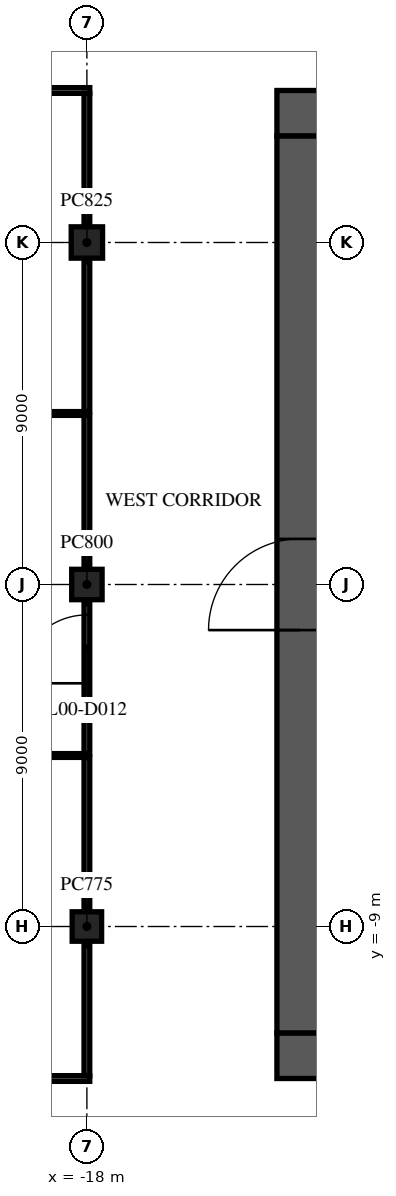
"""IFC4 building model, lengths in metres.
Left out: names, types, materials, properties, quantities, classifications, styles, units other than length and angle.
Written with IfcOpenShell. Run it as: python <this file> out.ifc"""

import sys

from ifc_helpers import new_model, si_unit, direction, frame, frame_2d, origin, origin_2d, place, context, subcontext, project, spatial, rectangle, extrude, element, fill, save


model = new_model("IFC4")
c1 = context("Model", 3, precision=1e-05, world=origin(), true_north=direction((0.0, 1.0)))
c2 = subcontext(c1, "Body", "Model", "MODEL_VIEW")
j1 = project(units=[si_unit("LENGTHUNIT", "METRE"), si_unit("PLANEANGLEUNIT", "RADIAN")], contexts=[c1])
p1 = place(None, origin())
s1 = spatial("IfcSite", under=j1, at=p1, CompositionType="ELEMENT")
p2 = place(p1, origin())
s2 = spatial("IfcBuilding", under=s1, at=p2, CompositionType="ELEMENT")
p3 = place(p2, origin())
s3 = spatial("IfcBuildingStorey", under=s2, at=p3, CompositionType="ELEMENT", Elevation=0.0)
p4 = place(p3, frame((-18.0, -9.0, 0.0), z_axis=(0.0, 0.0, 1.0), x_axis=(1.0, 0.0, 0.0)))
e1 = element("IfcColumn", 1, at=p4, inside=s3, PredefinedType="COLUMN", context=c2, shape_type="SweptSolid", body=[
    extrude(rectangle(XDim=0.775, YDim=0.775, at=origin_2d()), origin(), (0.0, 0.0, 1.0), 4.5),
])
p5 = place(p3, frame((-18.0, 0.0, 0.0), z_axis=(0.0, 0.0, 1.0), x_axis=(1.0, 0.0, 0.0)))
e2 = element("IfcColumn", 2, at=p5, inside=s3, PredefinedType="COLUMN", context=c2, shape_type="SweptSolid", body=[
    extrude(rectangle(XDim=0.8, YDim=0.8, at=origin_2d()), origin(), (0.0, 0.0, 1.0), 4.5),
])
p6 = place(p3, frame((-18.0, 9.0, 0.0), z_axis=(0.0, 0.0, 1.0), x_axis=(1.0, 0.0, 0.0)))
e3 = element("IfcColumn", 3, at=p6, inside=s3, PredefinedType="COLUMN", context=c2, shape_type="SweptSolid", body=[
    extrude(rectangle(XDim=0.825, YDim=0.825, at=origin_2d()), origin(), (0.0, 0.0, 1.0), 4.5),
])
p7 = place(p3, frame((-13.0, 12.4, 0.0), z_axis=(0.0, 0.0, 1.0), x_axis=(1.0, 0.0, 0.0)))
e4 = element("IfcWall", 4, at=p7, inside=s3, PredefinedType="SHEAR", context=c2, shape_type="SweptSolid", body=[
    extrude(rectangle(XDim=26.0, YDim=1.2, at=frame_2d((13.0, 0.0))), origin(), (0.0, 0.0, 1.0), 4.1),
])
p8 = place(p7, frame((11.8, 0.0, 0.0)))
e5 = element("IfcOpeningElement", 5, at=p8, cuts=e4, PredefinedType="OPENING", context=c2, shape_type="SweptSolid", body=[
    extrude(rectangle(XDim=2.4, YDim=2.4, at=frame_2d((1.2, 1.2))), frame((0.0, 0.61, 0.0), z_axis=(0.0, -1.0, 0.0), x_axis=(1.0, 0.0, 0.0)), (0.0, 0.0, 1.0), 1.22),
])
p9 = place(p7, frame((22.625, 0.0, 0.0)))
e6 = element("IfcOpeningElement", 6, at=p9, cuts=e4, PredefinedType="OPENING", context=c2, shape_type="SweptSolid", body=[
    extrude(rectangle(XDim=1.2, YDim=2.1, at=frame_2d((0.6, 1.05))), frame((0.0, 0.61, 0.0), z_axis=(0.0, -1.0, 0.0), x_axis=(1.0, 0.0, 0.0)), (0.0, 0.0, 1.0), 1.22),
])
p10 = place(p7, frame((1.6, 0.0, 0.0)))
e7 = element("IfcOpeningElement", 7, at=p10, cuts=e4, PredefinedType="OPENING", context=c2, shape_type="SweptSolid", body=[
    extrude(rectangle(XDim=1.0, YDim=2.1, at=frame_2d((0.5, 1.05))), frame((0.0, 0.61, 0.0), z_axis=(0.0, -1.0, 0.0), x_axis=(1.0, 0.0, 0.0)), (0.0, 0.0, 1.0), 1.22),
])
p11 = place(p3, frame((-13.0, -12.4, 0.0), z_axis=(0.0, 0.0, 1.0), x_axis=(1.0, 0.0, 0.0)))
e8 = element("IfcWall", 8, at=p11, inside=s3, PredefinedType="SHEAR", context=c2, shape_type="SweptSolid", body=[
    extrude(rectangle(XDim=26.0, YDim=1.2, at=frame_2d((13.0, 0.0))), origin(), (0.0, 0.0, 1.0), 4.1),
])
p12 = place(p11, frame((7.9, 0.0, 0.0)))
e9 = element("IfcOpeningElement", 9, at=p12, cuts=e8, PredefinedType="OPENING", context=c2, shape_type="SweptSolid", body=[
    extrude(rectangle(XDim=2.0, YDim=2.1, at=frame_2d((1.0, 1.05))), frame((0.0, 0.61, 0.0), z_axis=(0.0, -1.0, 0.0), x_axis=(1.0, 0.0, 0.0)), (0.0, 0.0, 1.0), 1.22),
])
p13 = place(p11, frame((18.025, 0.0, 0.0)))
e10 = element("IfcOpeningElement", 10, at=p13, cuts=e8, PredefinedType="OPENING", context=c2, shape_type="SweptSolid", body=[
    extrude(rectangle(XDim=1.2, YDim=2.1, at=frame_2d((0.6, 1.05))), frame((0.0, 0.61, 0.0), z_axis=(0.0, -1.0, 0.0), x_axis=(1.0, 0.0, 0.0)), (0.0, 0.0, 1.0), 1.22),
])
p14 = place(p11, frame((2.175, 0.0, 0.0)))
e11 = element("IfcOpeningElement", 11, at=p14, cuts=e8, PredefinedType="OPENING", context=c2, shape_type="SweptSolid", body=[
    extrude(rectangle(XDim=1.2, YDim=2.1, at=frame_2d((0.6, 1.05))), frame((0.0, 0.61, 0.0), z_axis=(0.0, -1.0, 0.0), x_axis=(1.0, 0.0, 0.0)), (0.0, 0.0, 1.0), 1.22),
])
p15 = place(p11, frame((22.625, 0.0, 0.0)))
e12 = element("IfcOpeningElement", 12, at=p15, cuts=e8, PredefinedType="OPENING", context=c2, shape_type="SweptSolid", body=[
    extrude(rectangle(XDim=1.2, YDim=2.1, at=frame_2d((0.6, 1.05))), frame((0.0, 0.61, 0.0), z_axis=(0.0, -1.0, 0.0), x_axis=(1.0, 0.0, 0.0)), (0.0, 0.0, 1.0), 1.22),
])
p16 = place(p3, frame((-12.4, -11.8, 0.0), z_axis=(0.0, 0.0, 1.0), x_axis=(0.0, 1.0, 0.0)))
e13 = element("IfcWall", 13, at=p16, inside=s3, PredefinedType="SHEAR", context=c2, shape_type="SweptSolid", body=[
    extrude(rectangle(XDim=23.6, YDim=1.2, at=frame_2d((11.8, 0.0))), origin(), (0.0, 0.0, 1.0), 4.1),
])
p17 = place(p16, frame((10.6, 0.0, 0.0)))
e14 = element("IfcOpeningElement", 14, at=p17, cuts=e13, PredefinedType="OPENING", context=c2, shape_type="SweptSolid", body=[
    extrude(rectangle(XDim=2.4, YDim=2.4, at=frame_2d((1.2, 1.2))), frame((0.0, 0.61, 0.0), z_axis=(0.0, -1.0, 0.0), x_axis=(1.0, 0.0, 0.0)), (0.0, 0.0, 1.0), 1.22),
])
p18 = place(p3, frame((-36.0, -13.0, 0.0), z_axis=(0.0, 0.0, 1.0), x_axis=(1.0, 0.0, 0.0)))
e15 = element("IfcWall", 15, at=p18, inside=s3, PredefinedType="PARTITIONING", context=c2, shape_type="SweptSolid", body=[
    extrude(rectangle(XDim=18.075, YDim=0.15, at=frame_2d((9.038, 0.0))), origin(), (0.0, 0.0, 1.0), 4.1),
])
p19 = place(p18, frame((8.1, 0.0, 0.0)))
e16 = element("IfcOpeningElement", 16, at=p19, cuts=e15, PredefinedType="OPENING", context=c2, shape_type="SweptSolid", body=[
    extrude(rectangle(XDim=1.8, YDim=2.1, at=frame_2d((0.9, 1.05))), frame((0.0, 0.085, 0.0), z_axis=(0.0, -1.0, 0.0), x_axis=(1.0, 0.0, 0.0)), (0.0, 0.0, 1.0), 0.17),
])
for number, where, z_axis, x_axis in (
    (17, (-36.0, -4.5, 0.0), (0.0, 0.0, 1.0), (1.0, 0.0, 0.0)),
    (18, (-36.0, 4.5, 0.0), (0.0, 0.0, 1.0), (1.0, 0.0, 0.0)),
):
    element("IfcWall", number, at=place(p3, frame(where, z_axis=z_axis, x_axis=x_axis)), inside=s3, PredefinedType="PARTITIONING", context=c2, shape_type="SweptSolid", body=[
        extrude(rectangle(XDim=17.925, YDim=0.1, at=frame_2d((8.962, 0.0))), origin(), (0.0, 0.0, 1.0), 4.1),
    ])
p20 = place(p3, frame((-36.0, 13.0, 0.0), z_axis=(0.0, 0.0, 1.0), x_axis=(1.0, 0.0, 0.0)))
e19 = element("IfcWall", 19, at=p20, inside=s3, PredefinedType="PARTITIONING", context=c2, shape_type="SweptSolid", body=[
    extrude(rectangle(XDim=18.075, YDim=0.15, at=frame_2d((9.038, 0.0))), origin(), (0.0, 0.0, 1.0), 4.1),
])
p21 = place(p20, frame((8.5, 0.0, 0.0)))
e20 = element("IfcOpeningElement", 20, at=p21, cuts=e19, PredefinedType="OPENING", context=c2, shape_type="SweptSolid", body=[
    extrude(rectangle(XDim=1.0, YDim=2.1, at=frame_2d((0.5, 1.05))), frame((0.0, 0.085, 0.0), z_axis=(0.0, -1.0, 0.0), x_axis=(1.0, 0.0, 0.0)), (0.0, 0.0, 1.0), 0.17),
])
p22 = place(p3, frame((-18.0, -12.925, 0.0), z_axis=(0.0, 0.0, 1.0), x_axis=(0.0, 1.0, 0.0)))
e21 = element("IfcWall", 21, at=p22, inside=s3, PredefinedType="PARTITIONING", context=c2, shape_type="SweptSolid", body=[
    extrude(rectangle(XDim=3.425, YDim=0.15, at=frame_2d((1.712, 0.0))), origin(), (0.0, 0.0, 1.0), 4.1),
])
p23 = place(p3, frame((-18.0, -8.5, 0.0), z_axis=(0.0, 0.0, 1.0), x_axis=(0.0, 1.0, 0.0)))
e22 = element("IfcWall", 22, at=p23, inside=s3, PredefinedType="PARTITIONING", context=c2, shape_type="SweptSolid", body=[
    extrude(rectangle(XDim=3.95, YDim=0.15, at=frame_2d((1.975, 0.0))), origin(), (0.0, 0.0, 1.0), 4.1),
])
p24 = place(p3, frame((-18.0, -4.45, 0.0), z_axis=(0.0, 0.0, 1.0), x_axis=(0.0, 1.0, 0.0)))
e23 = element("IfcWall", 23, at=p24, inside=s3, PredefinedType="PARTITIONING", context=c2, shape_type="SweptSolid", body=[
    extrude(rectangle(XDim=3.95, YDim=0.15, at=frame_2d((1.975, 0.0))), origin(), (0.0, 0.0, 1.0), 4.1),
])
p25 = place(p24, frame((1.85, 0.0, 0.0)))
e24 = element("IfcOpeningElement", 24, at=p25, cuts=e23, PredefinedType="OPENING", context=c2, shape_type="SweptSolid", body=[
    extrude(rectangle(XDim=1.8, YDim=2.1, at=frame_2d((0.9, 1.05))), frame((0.0, 0.085, 0.0), z_axis=(0.0, -1.0, 0.0), x_axis=(1.0, 0.0, 0.0)), (0.0, 0.0, 1.0), 0.17),
])
for number, where, z_axis, x_axis in (
    (25, (-18.0, 0.5, 0.0), (0.0, 0.0, 1.0), (0.0, 1.0, 0.0)),
    (26, (-18.0, 4.55, 0.0), (0.0, 0.0, 1.0), (0.0, 1.0, 0.0)),
):
    element("IfcWall", number, at=place(p3, frame(where, z_axis=z_axis, x_axis=x_axis)), inside=s3, PredefinedType="PARTITIONING", context=c2, shape_type="SweptSolid", body=[
        extrude(rectangle(XDim=3.95, YDim=0.15, at=frame_2d((1.975, 0.0))), origin(), (0.0, 0.0, 1.0), 4.1),
    ])
p26 = place(p3, frame((-18.0, 9.5, 0.0), z_axis=(0.0, 0.0, 1.0), x_axis=(0.0, 1.0, 0.0)))
e27 = element("IfcWall", 27, at=p26, inside=s3, PredefinedType="PARTITIONING", context=c2, shape_type="SweptSolid", body=[
    extrude(rectangle(XDim=3.425, YDim=0.15, at=frame_2d((1.712, 0.0))), origin(), (0.0, 0.0, 1.0), 4.1),
])
p27 = place(p17, origin())
e28 = element("IfcDoor", 28, at=p27, inside=s3, OperationType="SINGLE_SWING_LEFT", PredefinedType="DOOR", context=c2, shape_type="SweptSolid", body=[
    extrude(rectangle(XDim=2.4, YDim=2.4, at=frame_2d((1.2, 1.2))), frame((0.0, 0.025, 0.0), z_axis=(0.0, -1.0, 0.0), x_axis=(1.0, 0.0, 0.0)), (0.0, 0.0, 1.0), 0.05),
])
fill(e14, e28)
p28 = place(p25, origin())
e29 = element("IfcDoor", 29, at=p28, inside=s3, OperationType="DOUBLE_DOOR_SINGLE_SWING", PredefinedType="DOOR", context=c2, shape_type="SweptSolid", body=[
    extrude(rectangle(XDim=1.8, YDim=2.1, at=frame_2d((0.9, 1.05))), frame((0.0, 0.025, 0.0), z_axis=(0.0, -1.0, 0.0), x_axis=(1.0, 0.0, 0.0)), (0.0, 0.0, 1.0), 0.05),
])
fill(e24, e29)
save(model, sys.argv[1])
